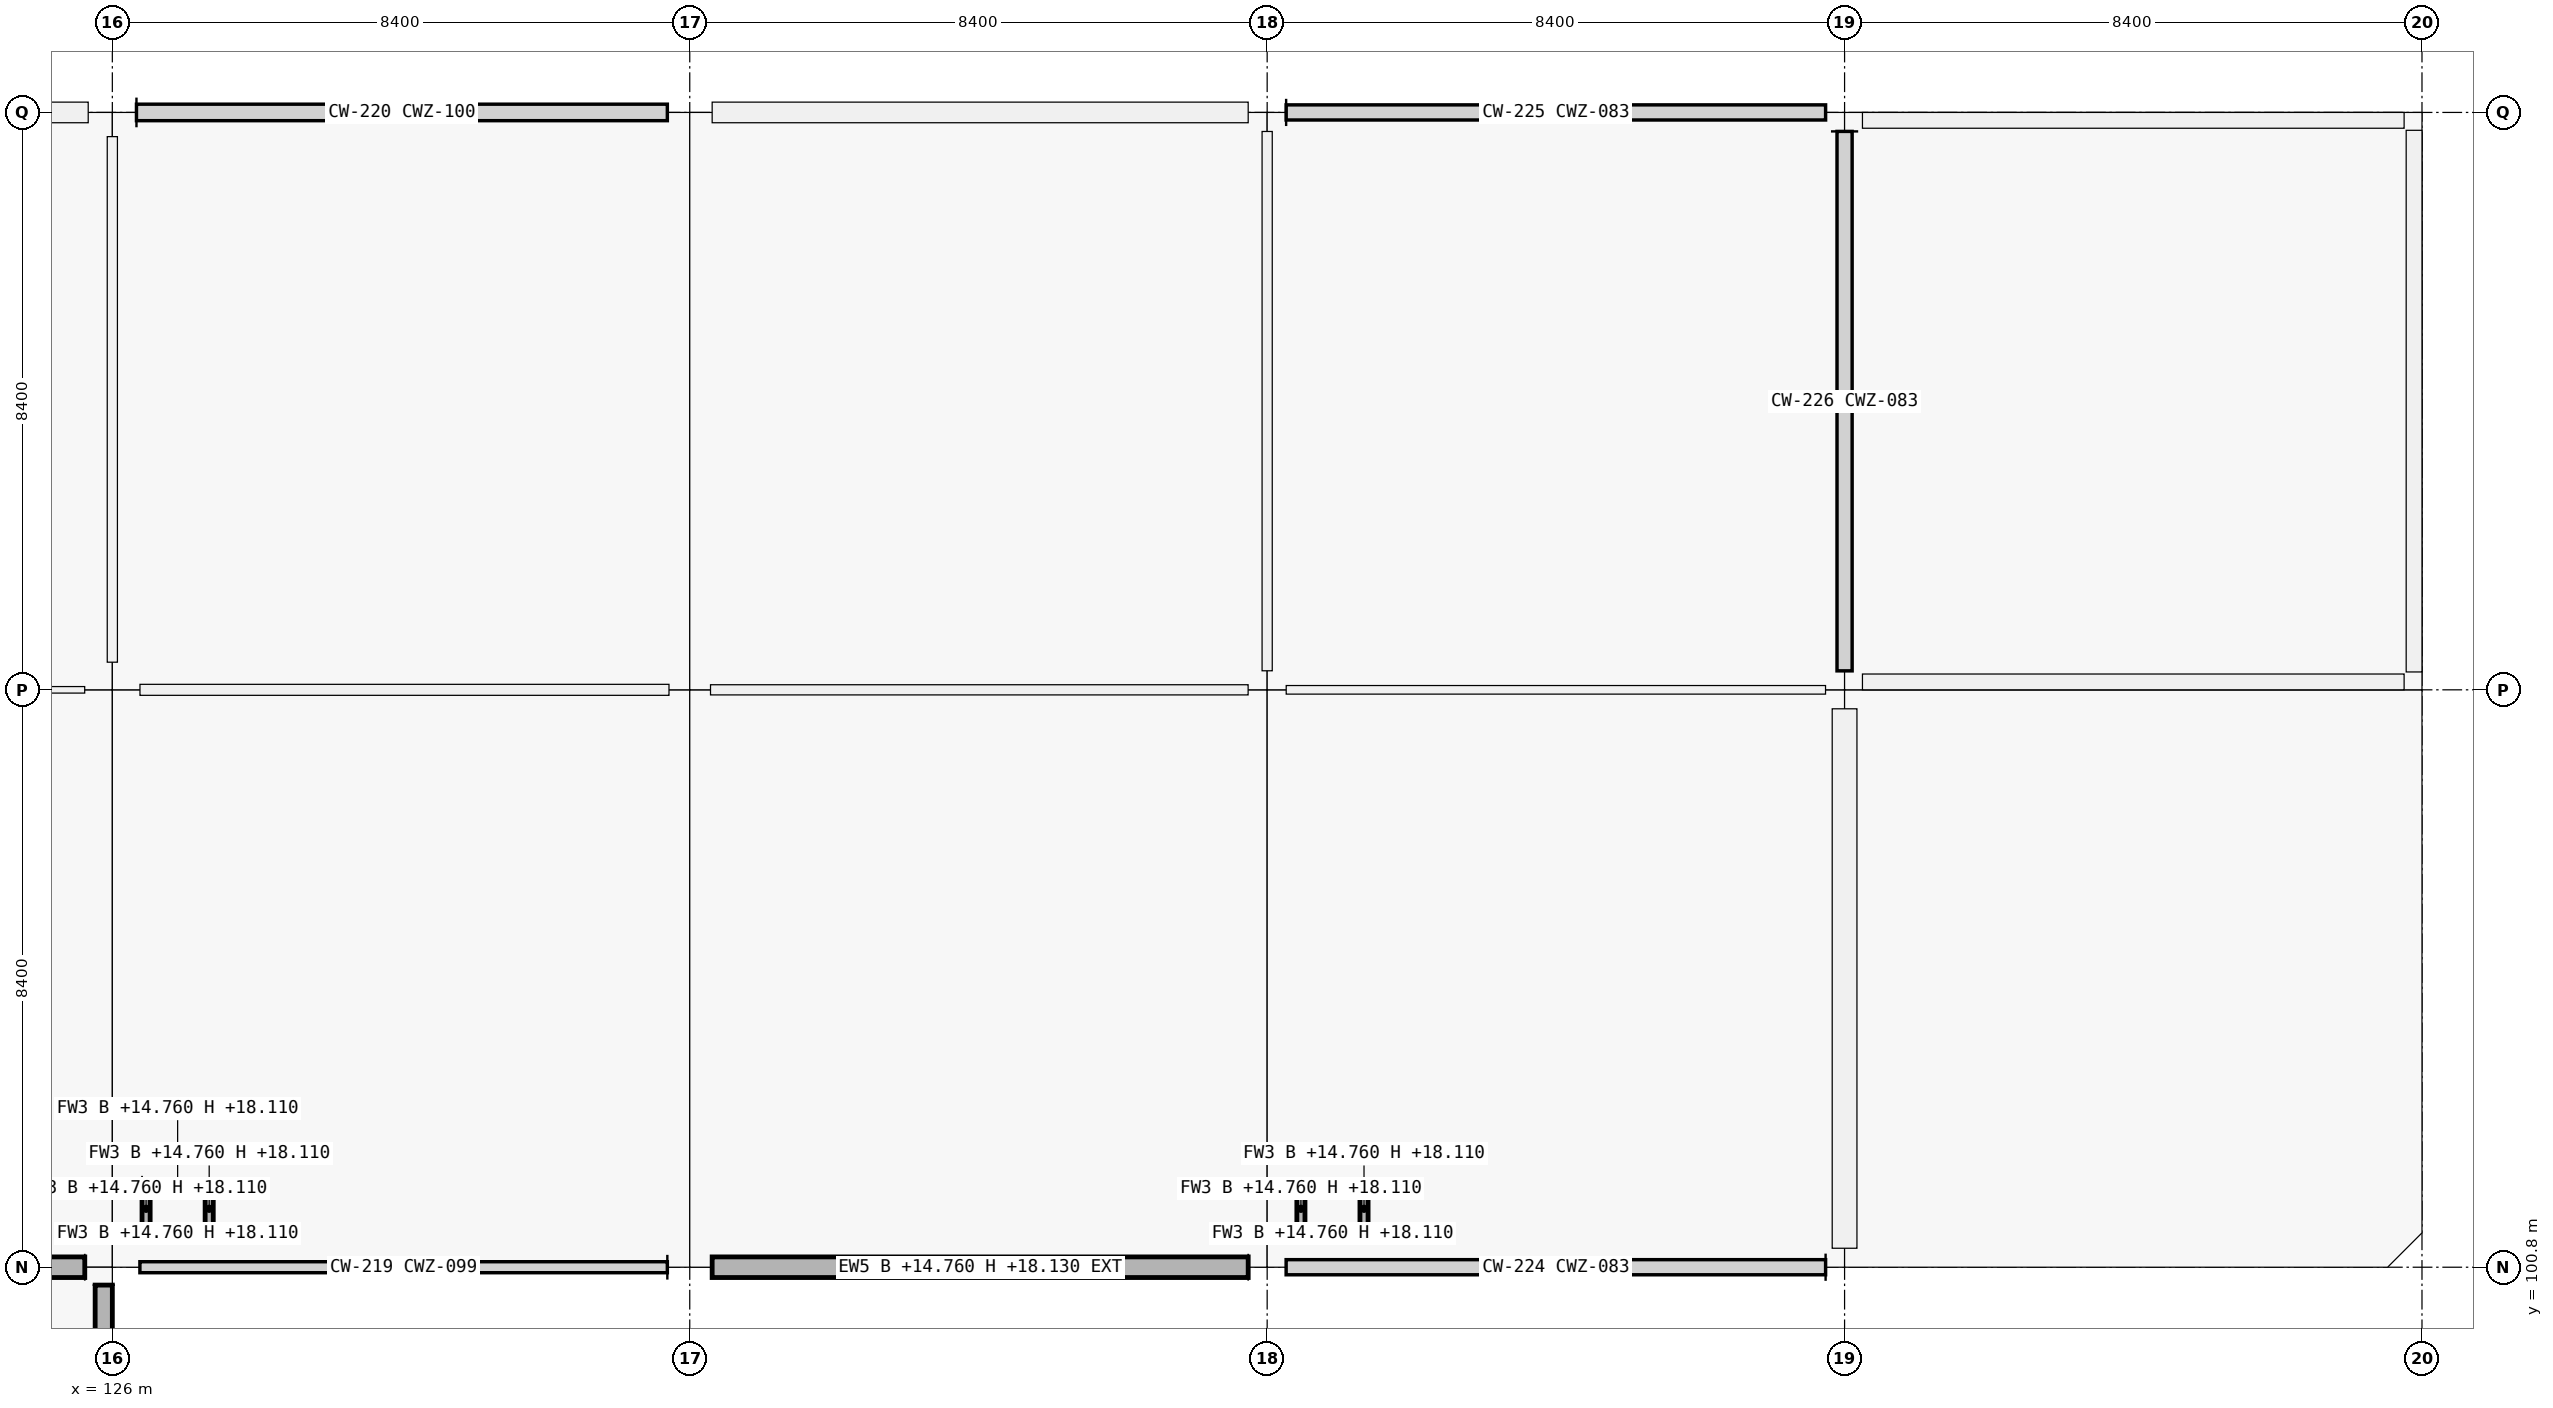
"""IFC4 building model, lengths in metres.
Left out: names, types, materials, properties, quantities, classifications, styles, units other than length and angle.
Written with IfcOpenShell. Run it as: python <this file> out.ifc"""

import sys

from ifc_helpers import new_model, si_unit, direction, frame, frame_2d, origin, origin_2d, place, context, subcontext, project, spatial, rectangle, extrude, element, fill, save


model = new_model("IFC4")
c1 = context("Model", 3, precision=1e-05, world=origin(), true_north=direction((0.0, 1.0)))
c2 = subcontext(c1, "Body", "Model", "MODEL_VIEW")
j1 = project(units=[si_unit("LENGTHUNIT", "METRE"), si_unit("PLANEANGLEUNIT", "RADIAN")], contexts=[c1])
p1 = place(None, origin())
s1 = spatial("IfcSite", under=j1, at=p1, CompositionType="ELEMENT")
p2 = place(p1, origin())
s2 = spatial("IfcBuilding", under=s1, at=p2, CompositionType="ELEMENT")
p3 = place(p2, frame((0.0, 0.0, 14.76)))
s3 = spatial("IfcBuildingStorey", under=s2, at=p3, CompositionType="ELEMENT", Elevation=14.76)
for number, where, z_axis, x_axis in (
    (1, (126.0, 100.8, 0.0), (0.0, 0.0, 1.0), (1.0, 0.0, 0.0)),
    (2, (126.0, 109.2, 0.0), (0.0, 0.0, 1.0), (1.0, 0.0, 0.0)),
):
    element("IfcColumn", number, at=place(p3, frame(where, z_axis=z_axis, x_axis=x_axis)), inside=s3, PredefinedType="COLUMN", context=c2, shape_type="SweptSolid", body=[
        extrude(rectangle(XDim=0.8, YDim=0.8, at=origin_2d()), origin(), (0.0, 0.0, 1.0), 4.32),
    ])
p4 = place(p3, frame((126.0, 117.6, 0.0), z_axis=(0.0, 0.0, 1.0), x_axis=(1.0, 0.0, 0.0)))
e3 = element("IfcColumn", 3, at=p4, inside=s3, PredefinedType="COLUMN", context=c2, shape_type="SweptSolid", body=[
    extrude(rectangle(XDim=0.7, YDim=0.7, at=origin_2d()), origin(), (0.0, 0.0, 1.0), 4.32),
])
p5 = place(p3, frame((134.4, 100.8, 0.0), z_axis=(0.0, 0.0, 1.0), x_axis=(1.0, 0.0, 0.0)))
e4 = element("IfcColumn", 4, at=p5, inside=s3, PredefinedType="COLUMN", context=c2, shape_type="SweptSolid", body=[
    extrude(rectangle(XDim=0.65, YDim=0.65, at=origin_2d()), origin(), (0.0, 0.0, 1.0), 4.32),
])
p6 = place(p3, frame((134.4, 109.2, 0.0), z_axis=(0.0, 0.0, 1.0), x_axis=(1.0, 0.0, 0.0)))
e5 = element("IfcColumn", 5, at=p6, inside=s3, PredefinedType="COLUMN", context=c2, shape_type="SweptSolid", body=[
    extrude(rectangle(XDim=0.6, YDim=0.6, at=origin_2d()), origin(), (0.0, 0.0, 1.0), 4.32),
])
p7 = place(p3, frame((134.4, 117.6, 0.0), z_axis=(0.0, 0.0, 1.0), x_axis=(1.0, 0.0, 0.0)))
e6 = element("IfcColumn", 6, at=p7, inside=s3, PredefinedType="COLUMN", context=c2, shape_type="SweptSolid", body=[
    extrude(rectangle(XDim=0.65, YDim=0.65, at=origin_2d()), origin(), (0.0, 0.0, 1.0), 4.32),
])
for number, where, z_axis, x_axis in (
    (7, (142.8, 100.8, 0.0), (0.0, 0.0, 1.0), (1.0, 0.0, 0.0)),
    (8, (142.8, 109.2, 0.0), (0.0, 0.0, 1.0), (1.0, 0.0, 0.0)),
    (9, (142.8, 117.6, 0.0), (0.0, 0.0, 1.0), (1.0, 0.0, 0.0)),
    (10, (151.2, 100.8, 0.0), (0.0, 0.0, 1.0), (1.0, 0.0, 0.0)),
    (11, (151.2, 109.2, 0.0), (0.0, 0.0, 1.0), (1.0, 0.0, 0.0)),
    (12, (151.2, 117.6, 0.0), (0.0, 0.0, 1.0), (1.0, 0.0, 0.0)),
):
    element("IfcColumn", number, at=place(p3, frame(where, z_axis=z_axis, x_axis=x_axis)), inside=s3, PredefinedType="COLUMN", context=c2, shape_type="SweptSolid", body=[
        extrude(rectangle(XDim=0.55, YDim=0.55, at=origin_2d()), origin(), (0.0, 0.0, 1.0), 4.07),
    ])
p8 = place(p3, frame((125.599, 100.8, 0.0), z_axis=(0.0, 0.0, 1.0), x_axis=(-1.0, 0.0, 0.0)))
e13 = element("IfcWall", 13, at=p8, inside=s3, PredefinedType="SOLIDWALL", context=c2, shape_type="SweptSolid", body=[
    extrude(rectangle(XDim=7.598, YDim=0.3, at=frame_2d((3.799, 0.0))), origin(), (0.0, 0.0, 1.0), 3.37),
])
p9 = place(p8, frame((2.749, 0.0, 0.9)))
e14 = element("IfcOpeningElement", 14, at=p9, cuts=e13, PredefinedType="OPENING", context=c2, shape_type="SweptSolid", body=[
    extrude(rectangle(XDim=2.1, YDim=1.8, at=frame_2d((1.05, 0.9))), frame((0.0, 0.15, 0.0), z_axis=(0.0, -1.0, 0.0), x_axis=(1.0, 0.0, 0.0)), (0.0, 0.0, 1.0), 0.3),
])
p10 = place(p3, frame((117.976, 117.6, 0.0), z_axis=(0.0, 0.0, 1.0), x_axis=(1.0, 0.0, 0.0)))
e15 = element("IfcWall", 15, at=p10, inside=s3, PredefinedType="SOLIDWALL", context=c2, shape_type="SweptSolid", body=[
    extrude(rectangle(XDim=7.673, YDim=0.3, at=frame_2d((3.836, 0.0))), origin(), (0.0, 0.0, 1.0), 3.37),
])
p11 = place(p10, frame((2.636, 0.0, 0.9)))
e16 = element("IfcOpeningElement", 16, at=p11, cuts=e15, PredefinedType="OPENING", context=c2, shape_type="SweptSolid", body=[
    extrude(rectangle(XDim=2.4, YDim=1.8, at=frame_2d((1.2, 0.9))), frame((0.0, 0.15, 0.0), z_axis=(0.0, -1.0, 0.0), x_axis=(1.0, 0.0, 0.0)), (0.0, 0.0, 1.0), 0.3),
])
p12 = place(p3, frame((142.524, 100.8, 0.0), z_axis=(0.0, 0.0, 1.0), x_axis=(-1.0, 0.0, 0.0)))
e17 = element("IfcWall", 17, at=p12, inside=s3, PredefinedType="SOLIDWALL", context=c2, shape_type="SweptSolid", body=[
    extrude(rectangle(XDim=7.798, YDim=0.3, at=frame_2d((3.899, 0.0))), origin(), (0.0, 0.0, 1.0), 3.37),
])
p13 = place(p12, frame((2.599, 0.0, 0.9)))
e18 = element("IfcOpeningElement", 18, at=p13, cuts=e17, PredefinedType="OPENING", context=c2, shape_type="SweptSolid", body=[
    extrude(rectangle(XDim=2.6, YDim=2.1, at=frame_2d((1.3, 1.05))), frame((0.0, 0.15, 0.0), z_axis=(0.0, -1.0, 0.0), x_axis=(1.0, 0.0, 0.0)), (0.0, 0.0, 1.0), 0.3),
])
p14 = place(p3, frame((134.726, 117.6, 0.0), z_axis=(0.0, 0.0, 1.0), x_axis=(1.0, 0.0, 0.0)))
e19 = element("IfcWall", 19, at=p14, inside=s3, PredefinedType="SOLIDWALL", context=c2, shape_type="SweptSolid", body=[
    extrude(rectangle(XDim=7.798, YDim=0.3, at=frame_2d((3.899, 0.0))), origin(), (0.0, 0.0, 1.0), 3.37),
])
p15 = place(p14, frame((3.299, 0.0, 0.9)))
e20 = element("IfcOpeningElement", 20, at=p15, cuts=e19, PredefinedType="OPENING", context=c2, shape_type="SweptSolid", body=[
    extrude(rectangle(XDim=1.2, YDim=2.1, at=frame_2d((0.6, 1.05))), frame((0.0, 0.15, 0.0), z_axis=(0.0, -1.0, 0.0), x_axis=(1.0, 0.0, 0.0)), (0.0, 0.0, 1.0), 0.3),
])
p16 = place(p3, frame((151.2, 108.924, 0.0), z_axis=(0.0, 0.0, 1.0), x_axis=(0.0, -1.0, 0.0)))
e21 = element("IfcWall", 21, at=p16, inside=s3, PredefinedType="SOLIDWALL", context=c2, shape_type="SweptSolid", body=[
    extrude(rectangle(XDim=7.848, YDim=0.36, at=frame_2d((3.924, 0.0))), origin(), (0.0, 0.0, 1.0), 3.37),
])
p17 = place(p16, frame((3.364, 0.0, 0.0)))
e22 = element("IfcOpeningElement", 22, at=p17, cuts=e21, PredefinedType="OPENING", context=c2, shape_type="SweptSolid", body=[
    extrude(rectangle(XDim=1.12, YDim=2.2, at=frame_2d((0.56, 1.1))), frame((0.0, 0.18, 0.0), z_axis=(0.0, -1.0, 0.0), x_axis=(1.0, 0.0, 0.0)), (0.0, 0.0, 1.0), 0.36),
])
p18 = place(p3, frame((125.875, 100.54, 0.0), z_axis=(0.0, 0.0, 1.0), x_axis=(0.0, -1.0, 0.0)))
e23 = element("IfcWall", 23, at=p18, inside=s3, PredefinedType="PARAPET", context=c2, shape_type="SweptSolid", body=[
    extrude(rectangle(XDim=7.88, YDim=0.25, at=frame_2d((3.94, 0.0))), origin(), (0.0, 0.0, 1.0), 0.95),
])
for number, where, z_axis, x_axis in (
    (24, (159.34, 109.315, 0.0), (0.0, 0.0, 1.0), (-1.0, 0.0, 0.0)),
    (25, (151.46, 117.485, 0.0), (0.0, 0.0, 1.0), (1.0, 0.0, 0.0)),
    (26, (159.485, 117.34, 0.0), (0.0, 0.0, 1.0), (0.0, -1.0, 0.0)),
):
    element("IfcWall", number, at=place(p3, frame(where, z_axis=z_axis, x_axis=x_axis)), inside=s3, PredefinedType="PARAPET", context=c2, shape_type="SweptSolid", body=[
        extrude(rectangle(XDim=7.88, YDim=0.23, at=frame_2d((3.94, 0.0))), origin(), (0.0, 0.0, 1.0), 0.95),
    ])
for number, where, z_axis, x_axis in (
    (27, (126.432, 101.291, 0.0), (0.0, 0.0, 1.0), (1.0, 0.0, 0.0)),
    (28, (126.432, 102.009, 0.0), (0.0, 0.0, 1.0), (1.0, 0.0, 0.0)),
):
    element("IfcWall", number, at=place(p3, frame(where, z_axis=z_axis, x_axis=x_axis)), inside=s3, PredefinedType="PARTITIONING", context=c2, shape_type="SweptSolid", body=[
        extrude(rectangle(XDim=1.036, YDim=0.118, at=frame_2d((0.518, 0.0))), origin(), (0.0, 0.0, 1.0), 3.35),
    ])
for number, where, z_axis, x_axis in (
    (29, (126.491, 101.35, 0.0), (0.0, 0.0, 1.0), (0.0, 1.0, 0.0)),
    (30, (127.409, 101.35, 0.0), (0.0, 0.0, 1.0), (0.0, 1.0, 0.0)),
):
    element("IfcWall", number, at=place(p3, frame(where, z_axis=z_axis, x_axis=x_axis)), inside=s3, PredefinedType="PARTITIONING", context=c2, shape_type="SweptSolid", body=[
        extrude(rectangle(XDim=0.6, YDim=0.118, at=frame_2d((0.3, 0.0))), origin(), (0.0, 0.0, 1.0), 3.35),
    ])
for number, where, z_axis, x_axis in (
    (31, (143.232, 101.291, 0.0), (0.0, 0.0, 1.0), (1.0, 0.0, 0.0)),
    (32, (143.232, 102.009, 0.0), (0.0, 0.0, 1.0), (1.0, 0.0, 0.0)),
):
    element("IfcWall", number, at=place(p3, frame(where, z_axis=z_axis, x_axis=x_axis)), inside=s3, PredefinedType="PARTITIONING", context=c2, shape_type="SweptSolid", body=[
        extrude(rectangle(XDim=1.036, YDim=0.118, at=frame_2d((0.518, 0.0))), origin(), (0.0, 0.0, 1.0), 3.35),
    ])
for number, where, z_axis, x_axis in (
    (33, (143.291, 101.35, 0.0), (0.0, 0.0, 1.0), (0.0, 1.0, 0.0)),
    (34, (144.209, 101.35, 0.0), (0.0, 0.0, 1.0), (0.0, 1.0, 0.0)),
):
    element("IfcWall", number, at=place(p3, frame(where, z_axis=z_axis, x_axis=x_axis)), inside=s3, PredefinedType="PARTITIONING", context=c2, shape_type="SweptSolid", body=[
        extrude(rectangle(XDim=0.6, YDim=0.118, at=frame_2d((0.3, 0.0))), origin(), (0.0, 0.0, 1.0), 3.35),
    ])
p19 = place(p3, frame((118.002, 109.2, 0.0), z_axis=(0.0, 0.0, 1.0), x_axis=(1.0, 0.0, 0.0)))
e35 = element("IfcWall", 35, at=p19, inside=s3, PredefinedType="PARTITIONING", context=c2, shape_type="SweptSolid", body=[
    extrude(rectangle(XDim=7.596, YDim=0.095, at=frame_2d((3.798, 0.0))), origin(), (0.0, 0.0, 1.0), 3.19),
])
p20 = place(p19, frame((3.293, 0.0, 0.0)))
e36 = element("IfcOpeningElement", 36, at=p20, cuts=e35, PredefinedType="OPENING", context=c2, shape_type="SweptSolid", body=[
    extrude(rectangle(XDim=1.01, YDim=2.12, at=frame_2d((0.505, 1.06))), frame((0.0, 0.047, 0.0), z_axis=(0.0, -1.0, 0.0), x_axis=(1.0, 0.0, 0.0)), (0.0, 0.0, 1.0), 0.095),
])
p21 = place(p3, frame((126.402, 109.2, 0.0), z_axis=(0.0, 0.0, 1.0), x_axis=(1.0, 0.0, 0.0)))
e37 = element("IfcWall", 37, at=p21, inside=s3, PredefinedType="PARTITIONING", context=c2, shape_type="SweptSolid", body=[
    extrude(rectangle(XDim=7.696, YDim=0.16, at=frame_2d((3.848, 0.0))), origin(), (0.0, 0.0, 1.0), 3.19),
])
p22 = place(p21, frame((3.398, 0.0, 0.0)))
e38 = element("IfcOpeningElement", 38, at=p22, cuts=e37, PredefinedType="OPENING", context=c2, shape_type="SweptSolid", body=[
    extrude(rectangle(XDim=0.9, YDim=2.05, at=frame_2d((0.45, 1.025))), frame((0.0, 0.08, 0.0), z_axis=(0.0, -1.0, 0.0), x_axis=(1.0, 0.0, 0.0)), (0.0, 0.0, 1.0), 0.16),
])
p23 = place(p3, frame((134.702, 109.2, 0.0), z_axis=(0.0, 0.0, 1.0), x_axis=(1.0, 0.0, 0.0)))
e39 = element("IfcWall", 39, at=p23, inside=s3, PredefinedType="PARTITIONING", context=c2, shape_type="SweptSolid", body=[
    extrude(rectangle(XDim=7.821, YDim=0.148, at=frame_2d((3.911, 0.0))), origin(), (0.0, 0.0, 1.0), 3.19),
])
p24 = place(p23, frame((3.111, 0.0, 0.0)))
e40 = element("IfcOpeningElement", 40, at=p24, cuts=e39, PredefinedType="OPENING", context=c2, shape_type="SweptSolid", body=[
    extrude(rectangle(XDim=1.6, YDim=2.2, at=frame_2d((0.8, 1.1))), frame((0.0, 0.074, 0.0), z_axis=(0.0, -1.0, 0.0), x_axis=(1.0, 0.0, 0.0)), (0.0, 0.0, 1.0), 0.148),
])
p25 = place(p3, frame((143.077, 109.2, 0.0), z_axis=(0.0, 0.0, 1.0), x_axis=(1.0, 0.0, 0.0)))
e41 = element("IfcWall", 41, at=p25, inside=s3, PredefinedType="PARTITIONING", context=c2, shape_type="SweptSolid", body=[
    extrude(rectangle(XDim=7.846, YDim=0.125, at=frame_2d((3.923, 0.0))), origin(), (0.0, 0.0, 1.0), 3.19),
])
p26 = place(p25, frame((3.383, 0.0, 0.0)))
e42 = element("IfcOpeningElement", 42, at=p26, cuts=e41, PredefinedType="OPENING", context=c2, shape_type="SweptSolid", body=[
    extrude(rectangle(XDim=1.08, YDim=2.25, at=frame_2d((0.54, 1.125))), frame((0.0, 0.062, 0.0), z_axis=(0.0, -1.0, 0.0), x_axis=(1.0, 0.0, 0.0)), (0.0, 0.0, 1.0), 0.125),
])
p27 = place(p3, frame((126.0, 109.602, 0.0), z_axis=(0.0, 0.0, 1.0), x_axis=(0.0, 1.0, 0.0)))
e43 = element("IfcWall", 43, at=p27, inside=s3, PredefinedType="PARTITIONING", context=c2, shape_type="SweptSolid", body=[
    extrude(rectangle(XDim=7.646, YDim=0.148, at=frame_2d((3.823, 0.0))), origin(), (0.0, 0.0, 1.0), 3.19),
])
p28 = place(p3, frame((142.8, 109.477, 0.0), z_axis=(0.0, 0.0, 1.0), x_axis=(0.0, 1.0, 0.0)))
e44 = element("IfcWall", 44, at=p28, inside=s3, PredefinedType="PARTITIONING", context=c2, shape_type="SweptSolid", body=[
    extrude(rectangle(XDim=7.846, YDim=0.148, at=frame_2d((3.923, 0.0))), origin(), (0.0, 0.0, 1.0), 3.19),
])
p29 = place(p13, origin())
e45 = element("IfcWindow", 45, at=p29, inside=s3, PartitioningType="SINGLE_PANEL", PredefinedType="WINDOW", context=c2, shape_type="SweptSolid", body=[
    extrude(rectangle(XDim=2.6, YDim=2.1, at=frame_2d((1.3, 1.05))), frame((0.0, 0.03, 0.0), z_axis=(0.0, -1.0, 0.0), x_axis=(1.0, 0.0, 0.0)), (0.0, 0.0, 1.0), 0.06),
])
fill(e18, e45)
p30 = place(p15, origin())
e46 = element("IfcWindow", 46, at=p30, inside=s3, PartitioningType="SINGLE_PANEL", PredefinedType="WINDOW", context=c2, shape_type="SweptSolid", body=[
    extrude(rectangle(XDim=1.2, YDim=2.1, at=frame_2d((0.6, 1.05))), frame((0.0, 0.03, 0.0), z_axis=(0.0, -1.0, 0.0), x_axis=(1.0, 0.0, 0.0)), (0.0, 0.0, 1.0), 0.06),
])
fill(e20, e46)
p31 = place(p17, origin())
e47 = element("IfcDoor", 47, at=p31, inside=s3, OperationType="SINGLE_SWING_RIGHT", PredefinedType="DOOR", context=c2, shape_type="SweptSolid", body=[
    extrude(rectangle(XDim=1.12, YDim=2.2, at=frame_2d((0.56, 1.1))), frame((0.0, 0.025, 0.0), z_axis=(0.0, -1.0, 0.0), x_axis=(1.0, 0.0, 0.0)), (0.0, 0.0, 1.0), 0.05),
])
fill(e22, e47)
p32 = place(p22, origin())
e48 = element("IfcDoor", 48, at=p32, inside=s3, OperationType="SINGLE_SWING_RIGHT", PredefinedType="DOOR", context=c2, shape_type="SweptSolid", body=[
    extrude(rectangle(XDim=0.9, YDim=2.05, at=frame_2d((0.45, 1.025))), frame((0.0, 0.025, 0.0), z_axis=(0.0, -1.0, 0.0), x_axis=(1.0, 0.0, 0.0)), (0.0, 0.0, 1.0), 0.05),
])
fill(e38, e48)
p33 = place(p24, origin())
e49 = element("IfcDoor", 49, at=p33, inside=s3, OperationType="DOUBLE_DOOR_SINGLE_SWING", PredefinedType="DOOR", context=c2, shape_type="SweptSolid", body=[
    extrude(rectangle(XDim=1.6, YDim=2.2, at=frame_2d((0.8, 1.1))), frame((0.0, 0.025, 0.0), z_axis=(0.0, -1.0, 0.0), x_axis=(1.0, 0.0, 0.0)), (0.0, 0.0, 1.0), 0.05),
])
fill(e40, e49)
p34 = place(p26, origin())
e50 = element("IfcDoor", 50, at=p34, inside=s3, OperationType="SINGLE_SWING_LEFT", PredefinedType="DOOR", context=c2, shape_type="SweptSolid", body=[
    extrude(rectangle(XDim=1.08, YDim=2.25, at=frame_2d((0.54, 1.125))), frame((0.0, 0.025, 0.0), z_axis=(0.0, -1.0, 0.0), x_axis=(1.0, 0.0, 0.0)), (0.0, 0.0, 1.0), 0.05),
])
fill(e42, e50)
save(model, sys.argv[1])
